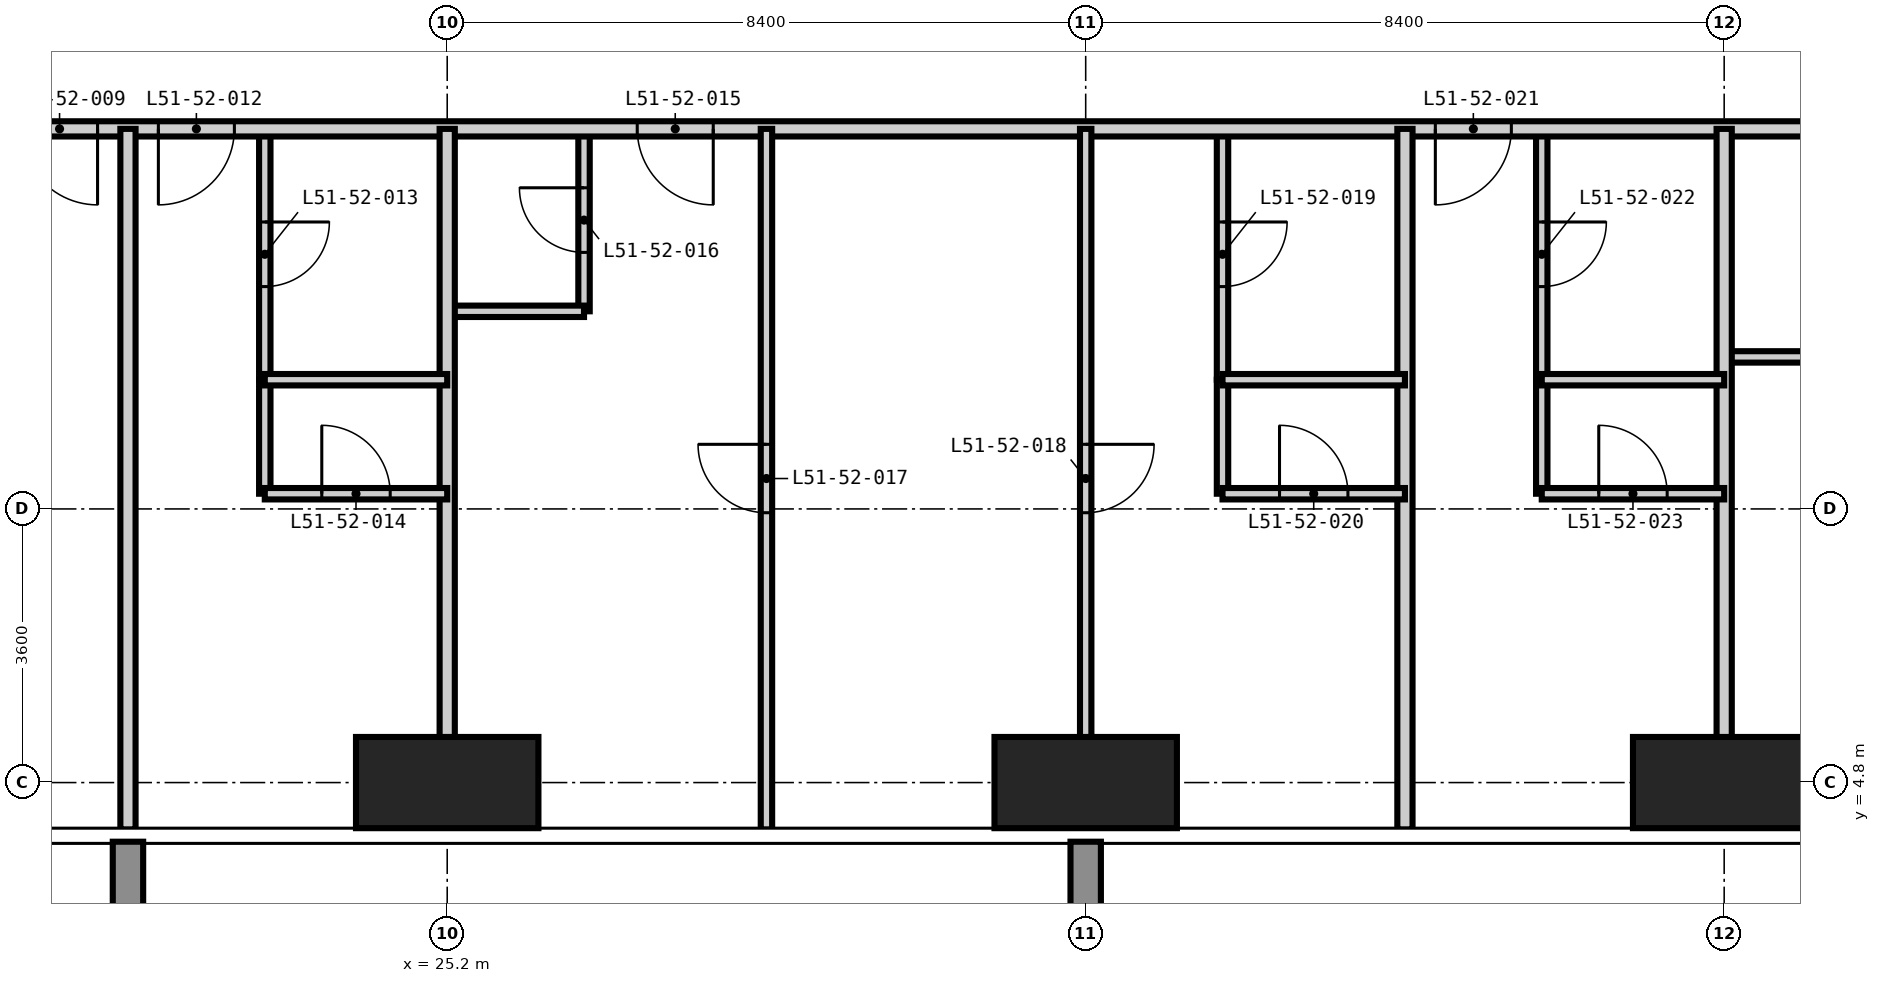
"""IFC4 building model, lengths in metres.
Left out: names, types, materials, properties, quantities, classifications, styles, units other than length and angle.
Written with IfcOpenShell. Run it as: python <this file> out.ifc"""

import sys

from ifc_helpers import new_model, si_unit, direction, frame, frame_2d, origin, origin_2d, place, context, subcontext, project, spatial, rectangle, extrude, element, fill, save


model = new_model("IFC4")
c1 = context("Model", 3, precision=1e-05, world=origin(), true_north=direction((0.0, 1.0)))
c2 = subcontext(c1, "Body", "Model", "MODEL_VIEW")
j1 = project(units=[si_unit("LENGTHUNIT", "METRE"), si_unit("PLANEANGLEUNIT", "RADIAN")], contexts=[c1])
p1 = place(None, origin())
s1 = spatial("IfcSite", under=j1, at=p1, CompositionType="ELEMENT")
p2 = place(p1, origin())
s2 = spatial("IfcBuilding", under=s1, at=p2, CompositionType="ELEMENT")
p3 = place(p2, frame((0.0, 0.0, 198.6)))
s3 = spatial("IfcBuildingStorey", under=s2, at=p3, CompositionType="ELEMENT", Elevation=198.6)
for number, where, z_axis, x_axis in (
    (1, (25.2, 4.8, -0.35), (0.0, 0.0, 1.0), (1.0, 0.0, 0.0)),
    (2, (33.6, 4.8, -0.35), (0.0, 0.0, 1.0), (1.0, 0.0, 0.0)),
    (3, (42.0, 4.8, -0.35), (0.0, 0.0, 1.0), (1.0, 0.0, 0.0)),
):
    element("IfcColumn", number, at=place(p3, frame(where, z_axis=z_axis, x_axis=x_axis)), inside=s3, PredefinedType="COLUMN", context=c2, shape_type="SweptSolid", body=[
        extrude(rectangle(XDim=2.4, YDim=1.2, at=origin_2d()), origin(), (0.0, 0.0, 1.0), 3.6),
    ])
p4 = place(p3, frame((22.8, 10.1, 0.0), z_axis=(0.0, 0.0, 1.0), x_axis=(0.0, 1.0, 0.0)))
e4 = element("IfcWall", 4, at=p4, inside=s3, PredefinedType="PARTITIONING", context=c2, shape_type="SweptSolid", body=[
    extrude(rectangle(XDim=3.3, YDim=0.15, at=frame_2d((1.65, 0.0))), origin(), (0.0, 0.0, 1.0), 3.25),
])
p5 = place(p4, frame((1.225, 0.0, 0.0)))
e5 = element("IfcOpeningElement", 5, at=p5, cuts=e4, PredefinedType="OPENING", context=c2, shape_type="SweptSolid", body=[
    extrude(rectangle(XDim=0.85, YDim=2.1, at=frame_2d((0.425, 1.05))), frame((0.0, 0.085, 0.0), z_axis=(0.0, -1.0, 0.0), x_axis=(1.0, 0.0, 0.0)), (0.0, 0.0, 1.0), 0.17),
])
p6 = place(p3, frame((27.0, 11.0, 0.0), z_axis=(0.0, 0.0, 1.0), x_axis=(0.0, 1.0, 0.0)))
e6 = element("IfcWall", 6, at=p6, inside=s3, PredefinedType="PARTITIONING", context=c2, shape_type="SweptSolid", body=[
    extrude(rectangle(XDim=2.4, YDim=0.15, at=frame_2d((1.2, 0.0))), origin(), (0.0, 0.0, 1.0), 3.25),
])
p7 = place(p6, frame((0.775, 0.0, 0.0)))
e7 = element("IfcOpeningElement", 7, at=p7, cuts=e6, PredefinedType="OPENING", context=c2, shape_type="SweptSolid", body=[
    extrude(rectangle(XDim=0.85, YDim=2.1, at=frame_2d((0.425, 1.05))), frame((0.0, 0.085, 0.0), z_axis=(0.0, -1.0, 0.0), x_axis=(1.0, 0.0, 0.0)), (0.0, 0.0, 1.0), 0.17),
])
p8 = place(p3, frame((35.4, 10.1, 0.0), z_axis=(0.0, 0.0, 1.0), x_axis=(0.0, 1.0, 0.0)))
e8 = element("IfcWall", 8, at=p8, inside=s3, PredefinedType="PARTITIONING", context=c2, shape_type="SweptSolid", body=[
    extrude(rectangle(XDim=3.3, YDim=0.15, at=frame_2d((1.65, 0.0))), origin(), (0.0, 0.0, 1.0), 3.25),
])
p9 = place(p8, frame((1.225, 0.0, 0.0)))
e9 = element("IfcOpeningElement", 9, at=p9, cuts=e8, PredefinedType="OPENING", context=c2, shape_type="SweptSolid", body=[
    extrude(rectangle(XDim=0.85, YDim=2.1, at=frame_2d((0.425, 1.05))), frame((0.0, 0.085, 0.0), z_axis=(0.0, -1.0, 0.0), x_axis=(1.0, 0.0, 0.0)), (0.0, 0.0, 1.0), 0.17),
])
p10 = place(p3, frame((39.6, 10.1, 0.0), z_axis=(0.0, 0.0, 1.0), x_axis=(0.0, 1.0, 0.0)))
e10 = element("IfcWall", 10, at=p10, inside=s3, PredefinedType="PARTITIONING", context=c2, shape_type="SweptSolid", body=[
    extrude(rectangle(XDim=3.3, YDim=0.15, at=frame_2d((1.65, 0.0))), origin(), (0.0, 0.0, 1.0), 3.25),
])
p11 = place(p10, frame((1.225, 0.0, 0.0)))
e11 = element("IfcOpeningElement", 11, at=p11, cuts=e10, PredefinedType="OPENING", context=c2, shape_type="SweptSolid", body=[
    extrude(rectangle(XDim=0.85, YDim=2.1, at=frame_2d((0.425, 1.05))), frame((0.0, 0.085, 0.0), z_axis=(0.0, -1.0, 0.0), x_axis=(1.0, 0.0, 0.0)), (0.0, 0.0, 1.0), 0.17),
])
p12 = place(p3, frame((42.0, 10.4, 0.0), z_axis=(0.0, 0.0, 1.0), x_axis=(1.0, 0.0, 0.0)))
e12 = element("IfcWall", 12, at=p12, inside=s3, PredefinedType="PARTITIONING", context=c2, shape_type="SweptSolid", body=[
    extrude(rectangle(XDim=2.2, YDim=0.15, at=frame_2d((1.1, 0.0))), origin(), (0.0, 0.0, 1.0), 3.25),
])
p13 = place(p3, frame((25.2, 11.0, 0.0), z_axis=(0.0, 0.0, 1.0), x_axis=(1.0, 0.0, 0.0)))
e13 = element("IfcWall", 13, at=p13, inside=s3, PredefinedType="PARTITIONING", context=c2, shape_type="SweptSolid", body=[
    extrude(rectangle(XDim=1.8, YDim=0.15, at=frame_2d((0.9, 0.0))), origin(), (0.0, 0.0, 1.0), 3.25),
])
p14 = place(p3, frame((44.2, 13.4, 0.0), z_axis=(0.0, 0.0, 1.0), x_axis=(-1.0, 0.0, 0.0)))
e14 = element("IfcWall", 14, at=p14, inside=s3, PredefinedType="PARTITIONING", context=c2, shape_type="SweptSolid", body=[
    extrude(rectangle(XDim=30.8, YDim=0.2, at=frame_2d((15.4, 0.0))), origin(), (0.0, 0.0, 1.0), 3.25),
])
p15 = place(p14, frame((23.6, 0.0, 0.0)))
e15 = element("IfcOpeningElement", 15, at=p15, cuts=e14, PredefinedType="OPENING", context=c2, shape_type="SweptSolid", body=[
    extrude(rectangle(XDim=1.0, YDim=2.2, at=frame_2d((0.5, 1.1))), frame((0.0, 0.11, 0.0), z_axis=(0.0, -1.0, 0.0), x_axis=(1.0, 0.0, 0.0)), (0.0, 0.0, 1.0), 0.22),
])
p16 = place(p14, frame((21.8, 0.0, 0.0)))
e16 = element("IfcOpeningElement", 16, at=p16, cuts=e14, PredefinedType="OPENING", context=c2, shape_type="SweptSolid", body=[
    extrude(rectangle(XDim=1.0, YDim=2.2, at=frame_2d((0.5, 1.1))), frame((0.0, 0.11, 0.0), z_axis=(0.0, -1.0, 0.0), x_axis=(1.0, 0.0, 0.0)), (0.0, 0.0, 1.0), 0.22),
])
p17 = place(p14, frame((15.5, 0.0, 0.0)))
e17 = element("IfcOpeningElement", 17, at=p17, cuts=e14, PredefinedType="OPENING", context=c2, shape_type="SweptSolid", body=[
    extrude(rectangle(XDim=1.0, YDim=2.2, at=frame_2d((0.5, 1.1))), frame((0.0, 0.11, 0.0), z_axis=(0.0, -1.0, 0.0), x_axis=(1.0, 0.0, 0.0)), (0.0, 0.0, 1.0), 0.22),
])
p18 = place(p14, frame((5.0, 0.0, 0.0)))
e18 = element("IfcOpeningElement", 18, at=p18, cuts=e14, PredefinedType="OPENING", context=c2, shape_type="SweptSolid", body=[
    extrude(rectangle(XDim=1.0, YDim=2.2, at=frame_2d((0.5, 1.1))), frame((0.0, 0.11, 0.0), z_axis=(0.0, -1.0, 0.0), x_axis=(1.0, 0.0, 0.0)), (0.0, 0.0, 1.0), 0.22),
])
for number, where, z_axis, x_axis in (
    (19, (21.0, 4.182, 0.0), (0.0, 0.0, 1.0), (0.0, 1.0, 0.0)),
    (20, (25.2, 4.182, 0.0), (0.0, 0.0, 1.0), (0.0, 1.0, 0.0)),
    (21, (37.8, 4.182, 0.0), (0.0, 0.0, 1.0), (0.0, 1.0, 0.0)),
    (22, (42.0, 4.182, 0.0), (0.0, 0.0, 1.0), (0.0, 1.0, 0.0)),
):
    element("IfcWall", number, at=place(p3, frame(where, z_axis=z_axis, x_axis=x_axis)), inside=s3, PredefinedType="PARTITIONING", context=c2, shape_type="SweptSolid", body=[
        extrude(rectangle(XDim=9.218, YDim=0.2, at=frame_2d((4.609, 0.0))), origin(), (0.0, 0.0, 1.0), 3.25),
    ])
p19 = place(p3, frame((22.8, 8.6, 0.0), z_axis=(0.0, 0.0, 1.0), x_axis=(0.0, 1.0, 0.0)))
e23 = element("IfcWall", 23, at=p19, inside=s3, PredefinedType="PARTITIONING", context=c2, shape_type="SweptSolid", body=[
    extrude(rectangle(XDim=1.5, YDim=0.15, at=frame_2d((0.75, 0.0))), origin(), (0.0, 0.0, 1.0), 3.25),
])
p20 = place(p3, frame((29.4, 4.182, 0.0), z_axis=(0.0, 0.0, 1.0), x_axis=(0.0, 1.0, 0.0)))
e24 = element("IfcWall", 24, at=p20, inside=s3, PredefinedType="PARTITIONING", context=c2, shape_type="SweptSolid", body=[
    extrude(rectangle(XDim=9.218, YDim=0.15, at=frame_2d((4.609, 0.0))), origin(), (0.0, 0.0, 1.0), 3.25),
])
p21 = place(p20, frame((4.168, 0.0, 0.0)))
e25 = element("IfcOpeningElement", 25, at=p21, cuts=e24, PredefinedType="OPENING", context=c2, shape_type="SweptSolid", body=[
    extrude(rectangle(XDim=0.9, YDim=2.1, at=frame_2d((0.45, 1.05))), frame((0.0, 0.085, 0.0), z_axis=(0.0, -1.0, 0.0), x_axis=(1.0, 0.0, 0.0)), (0.0, 0.0, 1.0), 0.17),
])
p22 = place(p3, frame((33.6, 4.182, 0.0), z_axis=(0.0, 0.0, 1.0), x_axis=(0.0, 1.0, 0.0)))
e26 = element("IfcWall", 26, at=p22, inside=s3, PredefinedType="PARTITIONING", context=c2, shape_type="SweptSolid", body=[
    extrude(rectangle(XDim=9.218, YDim=0.15, at=frame_2d((4.609, 0.0))), origin(), (0.0, 0.0, 1.0), 3.25),
])
p23 = place(p22, frame((4.168, 0.0, 0.0)))
e27 = element("IfcOpeningElement", 27, at=p23, cuts=e26, PredefinedType="OPENING", context=c2, shape_type="SweptSolid", body=[
    extrude(rectangle(XDim=0.9, YDim=2.1, at=frame_2d((0.45, 1.05))), frame((0.0, 0.085, 0.0), z_axis=(0.0, -1.0, 0.0), x_axis=(1.0, 0.0, 0.0)), (0.0, 0.0, 1.0), 0.17),
])
for number, where, z_axis, x_axis in (
    (28, (35.4, 8.6, 0.0), (0.0, 0.0, 1.0), (0.0, 1.0, 0.0)),
    (29, (39.6, 8.6, 0.0), (0.0, 0.0, 1.0), (0.0, 1.0, 0.0)),
):
    element("IfcWall", number, at=place(p3, frame(where, z_axis=z_axis, x_axis=x_axis)), inside=s3, PredefinedType="PARTITIONING", context=c2, shape_type="SweptSolid", body=[
        extrude(rectangle(XDim=1.5, YDim=0.15, at=frame_2d((0.75, 0.0))), origin(), (0.0, 0.0, 1.0), 3.25),
    ])
p24 = place(p3, frame((22.8, 8.6, 0.0), z_axis=(0.0, 0.0, 1.0), x_axis=(1.0, 0.0, 0.0)))
e30 = element("IfcWall", 30, at=p24, inside=s3, PredefinedType="PARTITIONING", context=c2, shape_type="SweptSolid", body=[
    extrude(rectangle(XDim=2.4, YDim=0.15, at=frame_2d((1.2, 0.0))), origin(), (0.0, 0.0, 1.0), 3.25),
])
p25 = place(p24, frame((0.75, 0.0, 0.0)))
e31 = element("IfcOpeningElement", 31, at=p25, cuts=e30, PredefinedType="OPENING", context=c2, shape_type="SweptSolid", body=[
    extrude(rectangle(XDim=0.9, YDim=2.1, at=frame_2d((0.45, 1.05))), frame((0.0, 0.085, 0.0), z_axis=(0.0, -1.0, 0.0), x_axis=(1.0, 0.0, 0.0)), (0.0, 0.0, 1.0), 0.17),
])
p26 = place(p3, frame((35.4, 8.6, 0.0), z_axis=(0.0, 0.0, 1.0), x_axis=(1.0, 0.0, 0.0)))
e32 = element("IfcWall", 32, at=p26, inside=s3, PredefinedType="PARTITIONING", context=c2, shape_type="SweptSolid", body=[
    extrude(rectangle(XDim=2.4, YDim=0.15, at=frame_2d((1.2, 0.0))), origin(), (0.0, 0.0, 1.0), 3.25),
])
p27 = place(p26, frame((0.75, 0.0, 0.0)))
e33 = element("IfcOpeningElement", 33, at=p27, cuts=e32, PredefinedType="OPENING", context=c2, shape_type="SweptSolid", body=[
    extrude(rectangle(XDim=0.9, YDim=2.1, at=frame_2d((0.45, 1.05))), frame((0.0, 0.085, 0.0), z_axis=(0.0, -1.0, 0.0), x_axis=(1.0, 0.0, 0.0)), (0.0, 0.0, 1.0), 0.17),
])
p28 = place(p3, frame((39.6, 8.6, 0.0), z_axis=(0.0, 0.0, 1.0), x_axis=(1.0, 0.0, 0.0)))
e34 = element("IfcWall", 34, at=p28, inside=s3, PredefinedType="PARTITIONING", context=c2, shape_type="SweptSolid", body=[
    extrude(rectangle(XDim=2.4, YDim=0.15, at=frame_2d((1.2, 0.0))), origin(), (0.0, 0.0, 1.0), 3.25),
])
p29 = place(p28, frame((0.75, 0.0, 0.0)))
e35 = element("IfcOpeningElement", 35, at=p29, cuts=e34, PredefinedType="OPENING", context=c2, shape_type="SweptSolid", body=[
    extrude(rectangle(XDim=0.9, YDim=2.1, at=frame_2d((0.45, 1.05))), frame((0.0, 0.085, 0.0), z_axis=(0.0, -1.0, 0.0), x_axis=(1.0, 0.0, 0.0)), (0.0, 0.0, 1.0), 0.17),
])
p30 = place(p3, frame((22.8, 10.1, 0.0), z_axis=(0.0, 0.0, 1.0), x_axis=(1.0, 0.0, 0.0)))
e36 = element("IfcWall", 36, at=p30, inside=s3, PredefinedType="PARTITIONING", context=c2, shape_type="SweptSolid", body=[
    extrude(rectangle(XDim=2.4, YDim=0.15, at=frame_2d((1.2, 0.0))), origin(), (0.0, 0.0, 1.0), 3.25),
])
p31 = place(p3, frame((35.4, 10.1, 0.0), z_axis=(0.0, 0.0, 1.0), x_axis=(1.0, 0.0, 0.0)))
e37 = element("IfcWall", 37, at=p31, inside=s3, PredefinedType="PARTITIONING", context=c2, shape_type="SweptSolid", body=[
    extrude(rectangle(XDim=2.4, YDim=0.15, at=frame_2d((1.2, 0.0))), origin(), (0.0, 0.0, 1.0), 3.25),
])
p32 = place(p3, frame((39.6, 10.1, 0.0), z_axis=(0.0, 0.0, 1.0), x_axis=(1.0, 0.0, 0.0)))
e38 = element("IfcWall", 38, at=p32, inside=s3, PredefinedType="PARTITIONING", context=c2, shape_type="SweptSolid", body=[
    extrude(rectangle(XDim=2.4, YDim=0.15, at=frame_2d((1.2, 0.0))), origin(), (0.0, 0.0, 1.0), 3.25),
])
p33 = place(p15, origin())
e39 = element("IfcDoor", 39, at=p33, inside=s3, OperationType="SINGLE_SWING_LEFT", PredefinedType="DOOR", context=c2, shape_type="SweptSolid", body=[
    extrude(rectangle(XDim=1.0, YDim=2.2, at=frame_2d((0.5, 1.1))), frame((0.0, 0.025, 0.0), z_axis=(0.0, -1.0, 0.0), x_axis=(1.0, 0.0, 0.0)), (0.0, 0.0, 1.0), 0.05),
])
fill(e15, e39)
p34 = place(p16, origin())
e40 = element("IfcDoor", 40, at=p34, inside=s3, OperationType="SINGLE_SWING_RIGHT", PredefinedType="DOOR", context=c2, shape_type="SweptSolid", body=[
    extrude(rectangle(XDim=1.0, YDim=2.2, at=frame_2d((0.5, 1.1))), frame((0.0, 0.025, 0.0), z_axis=(0.0, -1.0, 0.0), x_axis=(1.0, 0.0, 0.0)), (0.0, 0.0, 1.0), 0.05),
])
fill(e16, e40)
p35 = place(p5, frame((0.85, 0.0, 0.0), z_axis=(0.0, 0.0, 1.0), x_axis=(-1.0, 0.0, 0.0)))
e41 = element("IfcDoor", 41, at=p35, inside=s3, OperationType="SINGLE_SWING_LEFT", PredefinedType="DOOR", context=c2, shape_type="SweptSolid", body=[
    extrude(rectangle(XDim=0.85, YDim=2.1, at=frame_2d((0.425, 1.05))), frame((0.0, 0.025, 0.0), z_axis=(0.0, -1.0, 0.0), x_axis=(1.0, 0.0, 0.0)), (0.0, 0.0, 1.0), 0.05),
])
fill(e5, e41)
p36 = place(p25, origin())
e42 = element("IfcDoor", 42, at=p36, inside=s3, OperationType="SINGLE_SWING_LEFT", PredefinedType="DOOR", context=c2, shape_type="SweptSolid", body=[
    extrude(rectangle(XDim=0.9, YDim=2.1, at=frame_2d((0.45, 1.05))), frame((0.0, 0.025, 0.0), z_axis=(0.0, -1.0, 0.0), x_axis=(1.0, 0.0, 0.0)), (0.0, 0.0, 1.0), 0.05),
])
fill(e31, e42)
p37 = place(p17, origin())
e43 = element("IfcDoor", 43, at=p37, inside=s3, OperationType="SINGLE_SWING_LEFT", PredefinedType="DOOR", context=c2, shape_type="SweptSolid", body=[
    extrude(rectangle(XDim=1.0, YDim=2.2, at=frame_2d((0.5, 1.1))), frame((0.0, 0.025, 0.0), z_axis=(0.0, -1.0, 0.0), x_axis=(1.0, 0.0, 0.0)), (0.0, 0.0, 1.0), 0.05),
])
fill(e17, e43)
p38 = place(p7, origin())
e44 = element("IfcDoor", 44, at=p38, inside=s3, OperationType="SINGLE_SWING_RIGHT", PredefinedType="DOOR", context=c2, shape_type="SweptSolid", body=[
    extrude(rectangle(XDim=0.85, YDim=2.1, at=frame_2d((0.425, 1.05))), frame((0.0, 0.025, 0.0), z_axis=(0.0, -1.0, 0.0), x_axis=(1.0, 0.0, 0.0)), (0.0, 0.0, 1.0), 0.05),
])
fill(e7, e44)
p39 = place(p21, origin())
e45 = element("IfcDoor", 45, at=p39, inside=s3, OperationType="SINGLE_SWING_RIGHT", PredefinedType="DOOR", context=c2, shape_type="SweptSolid", body=[
    extrude(rectangle(XDim=0.9, YDim=2.1, at=frame_2d((0.45, 1.05))), frame((0.0, 0.025, 0.0), z_axis=(0.0, -1.0, 0.0), x_axis=(1.0, 0.0, 0.0)), (0.0, 0.0, 1.0), 0.05),
])
fill(e25, e45)
p40 = place(p23, frame((0.9, 0.0, 0.0), z_axis=(0.0, 0.0, 1.0), x_axis=(-1.0, 0.0, 0.0)))
e46 = element("IfcDoor", 46, at=p40, inside=s3, OperationType="SINGLE_SWING_LEFT", PredefinedType="DOOR", context=c2, shape_type="SweptSolid", body=[
    extrude(rectangle(XDim=0.9, YDim=2.1, at=frame_2d((0.45, 1.05))), frame((0.0, 0.025, 0.0), z_axis=(0.0, -1.0, 0.0), x_axis=(1.0, 0.0, 0.0)), (0.0, 0.0, 1.0), 0.05),
])
fill(e27, e46)
p41 = place(p9, frame((0.85, 0.0, 0.0), z_axis=(0.0, 0.0, 1.0), x_axis=(-1.0, 0.0, 0.0)))
e47 = element("IfcDoor", 47, at=p41, inside=s3, OperationType="SINGLE_SWING_LEFT", PredefinedType="DOOR", context=c2, shape_type="SweptSolid", body=[
    extrude(rectangle(XDim=0.85, YDim=2.1, at=frame_2d((0.425, 1.05))), frame((0.0, 0.025, 0.0), z_axis=(0.0, -1.0, 0.0), x_axis=(1.0, 0.0, 0.0)), (0.0, 0.0, 1.0), 0.05),
])
fill(e9, e47)
p42 = place(p27, origin())
e48 = element("IfcDoor", 48, at=p42, inside=s3, OperationType="SINGLE_SWING_LEFT", PredefinedType="DOOR", context=c2, shape_type="SweptSolid", body=[
    extrude(rectangle(XDim=0.9, YDim=2.1, at=frame_2d((0.45, 1.05))), frame((0.0, 0.025, 0.0), z_axis=(0.0, -1.0, 0.0), x_axis=(1.0, 0.0, 0.0)), (0.0, 0.0, 1.0), 0.05),
])
fill(e33, e48)
p43 = place(p18, origin())
e49 = element("IfcDoor", 49, at=p43, inside=s3, OperationType="SINGLE_SWING_RIGHT", PredefinedType="DOOR", context=c2, shape_type="SweptSolid", body=[
    extrude(rectangle(XDim=1.0, YDim=2.2, at=frame_2d((0.5, 1.1))), frame((0.0, 0.025, 0.0), z_axis=(0.0, -1.0, 0.0), x_axis=(1.0, 0.0, 0.0)), (0.0, 0.0, 1.0), 0.05),
])
fill(e18, e49)
p44 = place(p11, frame((0.85, 0.0, 0.0), z_axis=(0.0, 0.0, 1.0), x_axis=(-1.0, 0.0, 0.0)))
e50 = element("IfcDoor", 50, at=p44, inside=s3, OperationType="SINGLE_SWING_LEFT", PredefinedType="DOOR", context=c2, shape_type="SweptSolid", body=[
    extrude(rectangle(XDim=0.85, YDim=2.1, at=frame_2d((0.425, 1.05))), frame((0.0, 0.025, 0.0), z_axis=(0.0, -1.0, 0.0), x_axis=(1.0, 0.0, 0.0)), (0.0, 0.0, 1.0), 0.05),
])
fill(e11, e50)
p45 = place(p29, origin())
e51 = element("IfcDoor", 51, at=p45, inside=s3, OperationType="SINGLE_SWING_LEFT", PredefinedType="DOOR", context=c2, shape_type="SweptSolid", body=[
    extrude(rectangle(XDim=0.9, YDim=2.1, at=frame_2d((0.45, 1.05))), frame((0.0, 0.025, 0.0), z_axis=(0.0, -1.0, 0.0), x_axis=(1.0, 0.0, 0.0)), (0.0, 0.0, 1.0), 0.05),
])
fill(e35, e51)
save(model, sys.argv[1])
